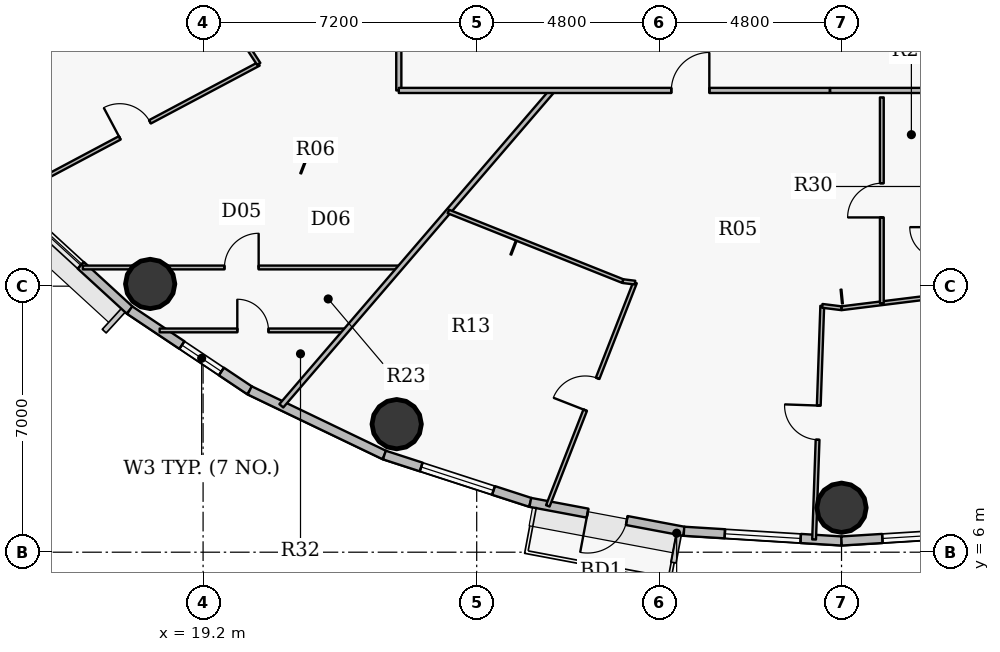
"""IFC4 building model, lengths in metres.
Left out: names, types, materials, properties, quantities, classifications, styles, units other than length and angle.
Written with IfcOpenShell. Run it as: python <this file> out.ifc"""

import sys

from ifc_helpers import new_model, si_unit, direction, frame, frame_2d, origin, origin_2d, place, context, subcontext, project, spatial, rectangle, hollow_circle, extrude, source, transform, mapped, element, fill, save


model = new_model("IFC4")
c1 = context("Model", 3, precision=1e-05, world=origin(), true_north=direction((0.0, 1.0)))
c2 = subcontext(c1, "Body", "Model", "MODEL_VIEW")
j1 = project(units=[si_unit("LENGTHUNIT", "METRE"), si_unit("PLANEANGLEUNIT", "RADIAN")], contexts=[c1])
p1 = place(None, origin())
s1 = spatial("IfcSite", under=j1, at=p1, CompositionType="ELEMENT")
p2 = place(p1, origin())
s2 = spatial("IfcBuilding", under=s1, at=p2, CompositionType="ELEMENT")
p3 = place(p2, frame((0.0, 0.0, 174.9)))
s3 = spatial("IfcBuildingStorey", under=s2, at=p3, CompositionType="ELEMENT", Elevation=174.9)
for number, where, z_axis, x_axis in (
    (1, (17.808, 13.058, 0.0), (0.0, 0.0, 1.0), (1.0, 0.0, 0.0)),
    (2, (24.294, 9.369, 0.0), (0.0, 0.0, 1.0), (1.0, 0.0, 0.0)),
    (3, (36.0, 7.17, 0.0), (0.0, 0.0, 1.0), (1.0, 0.0, 0.0)),
):
    element("IfcColumn", number, at=place(p3, frame(where, z_axis=z_axis, x_axis=x_axis)), inside=s3, PredefinedType="COLUMN", context=c2, shape_type="SweptSolid", body=[
        extrude(hollow_circle(Radius=0.65, WallThickness=0.04, at=origin_2d()), origin(), (0.0, 0.0, 1.0), 3.75),
    ])
p4 = place(p3, frame((17.268, 12.369, 0.0), z_axis=(0.0, 0.0, 1.0), x_axis=(-0.737076565834, 0.675809245349, 0.0)))
e4 = element("IfcWall", 4, at=p4, inside=s3, PredefinedType="SOLIDWALL", context=c2, shape_type="SweptSolid", body=[
    extrude(rectangle(XDim=3.658, YDim=0.24, at=frame_2d((1.829, 0.0))), origin(), (0.0, 0.0, 1.0), 3.5),
])
p5 = place(p4, frame((1.746, 0.0, 0.9)))
e5 = element("IfcOpeningElement", 5, at=p5, cuts=e4, PredefinedType="OPENING", context=c2, shape_type="SweptSolid", body=[
    extrude(rectangle(XDim=1.25, YDim=1.65, at=origin_2d()), frame((0.625, 0.13, 0.825), z_axis=(0.0, -1.0, 0.0), x_axis=(1.0, 0.0, 0.0)), (0.0, 0.0, 1.0), 0.26),
])
p6 = place(p3, frame((20.427, 10.257, 0.0), z_axis=(0.0, 0.0, 1.0), x_axis=(-0.831228998277, 0.555930168657, 0.0)))
e6 = element("IfcWall", 6, at=p6, inside=s3, PredefinedType="SOLIDWALL", context=c2, shape_type="SweptSolid", body=[
    extrude(rectangle(XDim=3.8, YDim=0.24, at=frame_2d((1.9, 0.0))), origin(), (0.0, 0.0, 1.0), 3.5),
])
p7 = place(p6, frame((0.896, 0.0, 0.9)))
e7 = element("IfcOpeningElement", 7, at=p7, cuts=e6, PredefinedType="OPENING", context=c2, shape_type="SweptSolid", body=[
    extrude(rectangle(XDim=1.25, YDim=1.65, at=origin_2d()), frame((0.625, 0.13, 0.825), z_axis=(0.0, -1.0, 0.0), x_axis=(1.0, 0.0, 0.0)), (0.0, 0.0, 1.0), 0.26),
])
p8 = place(p3, frame((23.97, 8.556, 0.0), z_axis=(0.0, 0.0, 1.0), x_axis=(-0.901564733809, 0.432644231155, 0.0)))
e8 = element("IfcWall", 8, at=p8, inside=s3, PredefinedType="SOLIDWALL", context=c2, shape_type="SweptSolid", body=[
    extrude(rectangle(XDim=3.93, YDim=0.24, at=frame_2d((1.965, 0.0))), origin(), (0.0, 0.0, 1.0), 3.5),
])
p9 = place(p3, frame((27.811, 7.311, 0.0), z_axis=(0.0, 0.0, 1.0), x_axis=(-0.951209870236, 0.30854462038, 0.0)))
e9 = element("IfcWall", 9, at=p9, inside=s3, PredefinedType="SOLIDWALL", context=c2, shape_type="SweptSolid", body=[
    extrude(rectangle(XDim=4.038, YDim=0.24, at=frame_2d((2.019, 0.0))), origin(), (0.0, 0.0, 1.0), 3.5),
])
p10 = place(p9, frame((1.019, 0.0, 0.9)))
e10 = element("IfcOpeningElement", 10, at=p10, cuts=e9, PredefinedType="OPENING", context=c2, shape_type="SweptSolid", body=[
    extrude(rectangle(XDim=2.0, YDim=1.75, at=origin_2d()), frame((1.0, 0.13, 0.875), z_axis=(0.0, -1.0, 0.0), x_axis=(1.0, 0.0, 0.0)), (0.0, 0.0, 1.0), 0.26),
])
p11 = place(p3, frame((31.854, 6.551, 0.0), z_axis=(0.0, 0.0, 1.0), x_axis=(-0.982788108205, 0.184736391573, 0.0)))
e11 = element("IfcWall", 11, at=p11, inside=s3, PredefinedType="SOLIDWALL", context=c2, shape_type="SweptSolid", body=[
    extrude(rectangle(XDim=4.114, YDim=0.24, at=frame_2d((2.057, 0.0))), origin(), (0.0, 0.0, 1.0), 3.5),
])
p12 = place(p11, frame((1.532, 0.0, 0.0)))
e12 = element("IfcOpeningElement", 12, at=p12, cuts=e11, PredefinedType="OPENING", context=c2, shape_type="SweptSolid", body=[
    extrude(rectangle(XDim=1.05, YDim=2.15, at=origin_2d()), frame((0.525, 0.13, 1.075), z_axis=(0.0, -1.0, 0.0), x_axis=(1.0, 0.0, 0.0)), (0.0, 0.0, 1.0), 0.26),
])
p13 = place(p3, frame((36.0, 6.295, 0.0), z_axis=(0.0, 0.0, 1.0), x_axis=(-0.998104600619, 0.061540281305, 0.0)))
e13 = element("IfcWall", 13, at=p13, inside=s3, PredefinedType="SOLIDWALL", context=c2, shape_type="SweptSolid", body=[
    extrude(rectangle(XDim=4.154, YDim=0.24, at=frame_2d((2.077, 0.0))), origin(), (0.0, 0.0, 1.0), 3.5),
])
p14 = place(p13, frame((1.077, 0.0, 0.9)))
e14 = element("IfcOpeningElement", 14, at=p14, cuts=e13, PredefinedType="OPENING", context=c2, shape_type="SweptSolid", body=[
    extrude(rectangle(XDim=2.0, YDim=1.75, at=origin_2d()), frame((1.0, 0.13, 0.875), z_axis=(0.0, -1.0, 0.0), x_axis=(1.0, 0.0, 0.0)), (0.0, 0.0, 1.0), 0.26),
])
p15 = place(p3, frame((40.146, 6.551, 0.0), z_axis=(0.0, 0.0, 1.0), x_axis=(-0.998104600619, -0.061540281305, 0.0)))
e15 = element("IfcWall", 15, at=p15, inside=s3, PredefinedType="SOLIDWALL", context=c2, shape_type="SweptSolid", body=[
    extrude(rectangle(XDim=4.154, YDim=0.24, at=frame_2d((2.077, 0.0))), origin(), (0.0, 0.0, 1.0), 3.5),
])
p16 = place(p15, frame((1.077, 0.0, 0.9)))
e16 = element("IfcOpeningElement", 16, at=p16, cuts=e15, PredefinedType="OPENING", context=c2, shape_type="SweptSolid", body=[
    extrude(rectangle(XDim=2.0, YDim=1.75, at=origin_2d()), frame((1.0, 0.13, 0.875), z_axis=(0.0, -1.0, 0.0), x_axis=(1.0, 0.0, 0.0)), (0.0, 0.0, 1.0), 0.26),
])
p17 = place(p3, frame((14.145, 15.379, 0.0), z_axis=(0.0, 0.0, 1.0), x_axis=(0.882946160832, 0.469474256027, 0.0)))
e17 = element("IfcWall", 17, at=p17, inside=s3, PredefinedType="PARTITIONING", context=c2, shape_type="SweptSolid", body=[
    extrude(rectangle(XDim=7.385, YDim=0.1, at=frame_2d((3.692, 0.0))), origin(), (0.0, 0.0, 1.0), 2.935),
])
p18 = place(p17, frame((3.242, 0.0, 0.0)))
e18 = element("IfcOpeningElement", 18, at=p18, cuts=e17, PredefinedType="OPENING", context=c2, shape_type="SweptSolid", body=[
    extrude(rectangle(XDim=0.9, YDim=2.1, at=origin_2d()), frame((0.45, 0.06, 1.05), z_axis=(0.0, -1.0, 0.0), x_axis=(1.0, 0.0, 0.0)), (0.0, 0.0, 1.0), 0.12),
])
p19 = place(p3, frame((16.037, 13.491, 0.0), z_axis=(0.0, 0.0, 1.0), x_axis=(1.0, 0.0, 0.0)))
e19 = element("IfcWall", 19, at=p19, inside=s3, PredefinedType="PARTITIONING", context=c2, shape_type="SweptSolid", body=[
    extrude(rectangle(XDim=8.35, YDim=0.1, at=frame_2d((4.175, 0.0))), origin(), (0.0, 0.0, 1.0), 2.935),
])
p20 = place(p19, frame((3.725, 0.0, 0.0)))
e20 = element("IfcOpeningElement", 20, at=p20, cuts=e19, PredefinedType="OPENING", context=c2, shape_type="SweptSolid", body=[
    extrude(rectangle(XDim=0.9, YDim=2.1, at=origin_2d()), frame((0.45, 0.06, 1.05), z_axis=(0.0, -1.0, 0.0), x_axis=(1.0, 0.0, 0.0)), (0.0, 0.0, 1.0), 0.12),
])
p21 = place(p3, frame((18.057, 11.836, 0.0), z_axis=(0.0, 0.0, 1.0), x_axis=(1.0, 0.0, 0.0)))
e21 = element("IfcWall", 21, at=p21, inside=s3, PredefinedType="PARTITIONING", context=c2, shape_type="SweptSolid", body=[
    extrude(rectangle(XDim=4.907, YDim=0.1, at=frame_2d((2.453, 0.0))), origin(), (0.0, 0.0, 1.0), 2.935),
])
p22 = place(p21, frame((2.043, 0.0, 0.0)))
e22 = element("IfcOpeningElement", 22, at=p22, cuts=e21, PredefinedType="OPENING", context=c2, shape_type="SweptSolid", body=[
    extrude(rectangle(XDim=0.82, YDim=2.1, at=origin_2d()), frame((0.41, 0.06, 1.05), z_axis=(0.0, -1.0, 0.0), x_axis=(1.0, 0.0, 0.0)), (0.0, 0.0, 1.0), 0.12),
])
p23 = place(p3, frame((18.291, 22.494, 0.0), z_axis=(0.0, 0.0, 1.0), x_axis=(0.545410225271, -0.838169246734, 0.0)))
e23 = element("IfcWall", 23, at=p23, inside=s3, PredefinedType="PARTITIONING", context=c2, shape_type="SweptSolid", body=[
    extrude(rectangle(XDim=4.352, YDim=0.1, at=frame_2d((2.176, 0.0))), origin(), (0.0, 0.0, 1.0), 2.935),
])
p24 = place(p3, frame((21.259, 9.852, 0.0), z_axis=(0.0, 0.0, 1.0), x_axis=(0.651889454341, 0.758314011026, 0.0)))
e24 = element("IfcWall", 24, at=p24, inside=s3, PredefinedType="PARTITIONING", context=c2, shape_type="SweptSolid", body=[
    extrude(rectangle(XDim=10.942, YDim=0.135, at=frame_2d((5.471, 0.0))), origin(), (0.0, 0.0, 1.0), 2.935),
])
p25 = place(p3, frame((24.35, 18.15, 0.0), z_axis=(0.0, 0.0, 1.0), x_axis=(0.0, 1.0, 0.0)))
e25 = element("IfcWall", 25, at=p25, inside=s3, PredefinedType="PARTITIONING", context=c2, shape_type="SweptSolid", body=[
    extrude(rectangle(XDim=7.485, YDim=0.135, at=frame_2d((3.742, 0.0))), origin(), (0.0, 0.0, 1.0), 2.935),
])
p26 = place(p25, frame((3.242, 0.0, 0.0)))
e26 = element("IfcOpeningElement", 26, at=p26, cuts=e25, PredefinedType="OPENING", context=c2, shape_type="SweptSolid", body=[
    extrude(rectangle(XDim=1.0, YDim=2.15, at=origin_2d()), frame((0.5, 0.078, 1.075), z_axis=(0.0, -1.0, 0.0), x_axis=(1.0, 0.0, 0.0)), (0.0, 0.0, 1.0), 0.155),
])
p27 = place(p3, frame((24.35, 18.15, 0.0), z_axis=(0.0, 0.0, 1.0), x_axis=(1.0, 0.0, 0.0)))
e27 = element("IfcWall", 27, at=p27, inside=s3, PredefinedType="PARTITIONING", context=c2, shape_type="SweptSolid", body=[
    extrude(rectangle(XDim=11.341, YDim=0.135, at=frame_2d((5.67, 0.0))), origin(), (0.0, 0.0, 1.0), 2.935),
])
p28 = place(p27, frame((7.171, 0.0, 0.0)))
e28 = element("IfcOpeningElement", 28, at=p28, cuts=e27, PredefinedType="OPENING", context=c2, shape_type="SweptSolid", body=[
    extrude(rectangle(XDim=1.0, YDim=2.15, at=origin_2d()), frame((0.5, 0.078, 1.075), z_axis=(0.0, -1.0, 0.0), x_axis=(1.0, 0.0, 0.0)), (0.0, 0.0, 1.0), 0.155),
])
p29 = place(p3, frame((25.654, 14.965, 0.0), z_axis=(0.0, 0.0, 1.0), x_axis=(0.928793067963, -0.370598754589, 0.0)))
e29 = element("IfcWall", 29, at=p29, inside=s3, PredefinedType="PARTITIONING", context=c2, shape_type="SweptSolid", body=[
    extrude(rectangle(XDim=4.944, YDim=0.1, at=frame_2d((2.472, 0.0))), origin(), (0.0, 0.0, 1.0), 2.935),
])
p30 = place(p3, frame((28.271, 7.219, 0.0), z_axis=(0.0, 0.0, 1.0), x_axis=(0.363936593544, 0.931423725207, 0.0)))
e30 = element("IfcWall", 30, at=p30, inside=s3, PredefinedType="PARTITIONING", context=c2, shape_type="SweptSolid", body=[
    extrude(rectangle(XDim=6.306, YDim=0.1, at=frame_2d((3.153, 0.0))), origin(), (0.0, 0.0, 1.0), 2.935),
])
p31 = place(p30, frame((2.703, 0.0, 0.0)))
e31 = element("IfcOpeningElement", 31, at=p31, cuts=e30, PredefinedType="OPENING", context=c2, shape_type="SweptSolid", body=[
    extrude(rectangle(XDim=0.9, YDim=2.1, at=origin_2d()), frame((0.45, 0.06, 1.05), z_axis=(0.0, -1.0, 0.0), x_axis=(1.0, 0.0, 0.0)), (0.0, 0.0, 1.0), 0.12),
])
p32 = place(p3, frame((30.246, 13.133, 0.0), z_axis=(0.0, 0.0, 1.0), x_axis=(0.992451589144, -0.122637038475, 0.0)))
e32 = element("IfcWall", 32, at=p32, inside=s3, PredefinedType="PARTITIONING", context=c2, shape_type="SweptSolid", body=[
    extrude(rectangle(XDim=0.323, YDim=0.1, at=frame_2d((0.161, 0.0))), origin(), (0.0, 0.0, 1.0), 3.5),
])
p33 = place(p3, frame((35.278, 6.334, 0.0), z_axis=(0.0, 0.0, 1.0), x_axis=(0.034887406989, 0.999391249128, 0.0)))
e33 = element("IfcWall", 33, at=p33, inside=s3, PredefinedType="PARTITIONING", context=c2, shape_type="SweptSolid", body=[
    extrude(rectangle(XDim=6.151, YDim=0.1, at=frame_2d((3.076, 0.0))), origin(), (0.0, 0.0, 1.0), 2.935),
])
p34 = place(p33, frame((2.625, 0.0, 0.0)))
e34 = element("IfcOpeningElement", 34, at=p34, cuts=e33, PredefinedType="OPENING", context=c2, shape_type="SweptSolid", body=[
    extrude(rectangle(XDim=0.9, YDim=2.1, at=origin_2d()), frame((0.45, 0.06, 1.05), z_axis=(0.0, -1.0, 0.0), x_axis=(1.0, 0.0, 0.0)), (0.0, 0.0, 1.0), 0.12),
])
p35 = place(p3, frame((35.493, 12.482, 0.0), z_axis=(0.0, 0.0, 1.0), x_axis=(0.992373140554, -0.123270231229, 0.0)))
e35 = element("IfcWall", 35, at=p35, inside=s3, PredefinedType="PARTITIONING", context=c2, shape_type="SweptSolid", body=[
    extrude(rectangle(XDim=0.511, YDim=0.1, at=frame_2d((0.255, 0.0))), origin(), (0.0, 0.0, 1.0), 2.935),
])
p36 = place(p3, frame((36.0, 12.419, 0.0), z_axis=(0.0, 0.0, 1.0), x_axis=(0.992396615981, 0.123081097612, 0.0)))
e36 = element("IfcWall", 36, at=p36, inside=s3, PredefinedType="PARTITIONING", context=c2, shape_type="SweptSolid", body=[
    extrude(rectangle(XDim=5.798, YDim=0.1, at=frame_2d((2.899, 0.0))), origin(), (0.0, 0.0, 1.0), 2.935),
])
p37 = place(p3, frame((37.061, 12.551, 0.0), z_axis=(0.0, 0.0, 1.0), x_axis=(0.0, 1.0, 0.0)))
e37 = element("IfcWall", 37, at=p37, inside=s3, PredefinedType="PARTITIONING", context=c2, shape_type="SweptSolid", body=[
    extrude(rectangle(XDim=5.416, YDim=0.1, at=frame_2d((2.708, 0.0))), origin(), (0.0, 0.0, 1.0), 3.185),
])
p38 = place(p37, frame((2.258, 0.0, 0.0)))
e38 = element("IfcOpeningElement", 38, at=p38, cuts=e37, PredefinedType="OPENING", context=c2, shape_type="SweptSolid", body=[
    extrude(rectangle(XDim=0.9, YDim=2.1, at=origin_2d()), frame((0.45, 0.06, 1.05), z_axis=(0.0, -1.0, 0.0), x_axis=(1.0, 0.0, 0.0)), (0.0, 0.0, 1.0), 0.12),
])
p39 = place(p3, frame((38.306, 18.15, 0.0), z_axis=(0.0, 0.0, 1.0), x_axis=(-1.0, 0.0, 0.0)))
e39 = element("IfcWall", 39, at=p39, inside=s3, PredefinedType="PARTITIONING", context=c2, shape_type="SweptSolid", body=[
    extrude(rectangle(XDim=2.605, YDim=0.135, at=frame_2d((1.302, 0.0))), origin(), (0.0, 0.0, 1.0), 2.935),
])
m1 = source(origin(), c2, "Body", "SweptSolid", [
    extrude(rectangle(XDim=1.25, YDim=1.65, at=origin_2d()), frame((0.625, 0.03, 0.825), z_axis=(0.0, -1.0, 0.0), x_axis=(1.0, 0.0, 0.0)), (0.0, 0.0, 1.0), 0.06),
])
p40 = place(p7, origin())
e40 = element("IfcWindow", 40, at=p40, inside=s3, PartitioningType="SINGLE_PANEL", PredefinedType="WINDOW", context=c2, shape_type="MappedRepresentation", body=[
    mapped(m1, transform((0.0, 0.0, 0.0), x_axis=(1.0, 0.0, 0.0), y_axis=(0.0, 1.0, 0.0), z_axis=(0.0, 0.0, 1.0), scale=1.0)),
])
fill(e7, e40)
m2 = source(origin(), c2, "Body", "SweptSolid", [
    extrude(rectangle(XDim=2.0, YDim=1.75, at=origin_2d()), frame((1.0, 0.03, 0.875), z_axis=(0.0, -1.0, 0.0), x_axis=(1.0, 0.0, 0.0)), (0.0, 0.0, 1.0), 0.06),
])
p41 = place(p10, origin())
e41 = element("IfcWindow", 41, at=p41, inside=s3, PartitioningType="DOUBLE_PANEL_VERTICAL", PredefinedType="WINDOW", context=c2, shape_type="MappedRepresentation", body=[
    mapped(m2, transform((0.0, 0.0, 0.0), x_axis=(1.0, 0.0, 0.0), y_axis=(0.0, 1.0, 0.0), z_axis=(0.0, 0.0, 1.0), scale=1.0)),
])
fill(e10, e41)
m3 = source(origin(), c2, "Body", "SweptSolid", [
    extrude(rectangle(XDim=1.05, YDim=2.15, at=origin_2d()), frame((0.525, 0.025, 1.075), z_axis=(0.0, -1.0, 0.0), x_axis=(1.0, 0.0, 0.0)), (0.0, 0.0, 1.0), 0.05),
])
p42 = place(p12, origin())
e42 = element("IfcDoor", 42, at=p42, inside=s3, OperationType="SINGLE_SWING_RIGHT", PredefinedType="DOOR", context=c2, shape_type="MappedRepresentation", body=[
    mapped(m3, transform((0.0, 0.0, 0.0), x_axis=(1.0, 0.0, 0.0), y_axis=(0.0, 1.0, 0.0), z_axis=(0.0, 0.0, 1.0), scale=1.0)),
])
fill(e12, e42)
p43 = place(p14, origin())
e43 = element("IfcWindow", 43, at=p43, inside=s3, PartitioningType="DOUBLE_PANEL_VERTICAL", PredefinedType="WINDOW", context=c2, shape_type="MappedRepresentation", body=[
    mapped(m2, transform((0.0, 0.0, 0.0), x_axis=(1.0, 0.0, 0.0), y_axis=(0.0, 1.0, 0.0), z_axis=(0.0, 0.0, 1.0), scale=1.0)),
])
fill(e14, e43)
p44 = place(p16, origin())
e44 = element("IfcWindow", 44, at=p44, inside=s3, PartitioningType="DOUBLE_PANEL_VERTICAL", PredefinedType="WINDOW", context=c2, shape_type="MappedRepresentation", body=[
    mapped(m2, transform((0.0, 0.0, 0.0), x_axis=(1.0, 0.0, 0.0), y_axis=(0.0, 1.0, 0.0), z_axis=(0.0, 0.0, 1.0), scale=1.0)),
])
fill(e16, e44)
p45 = place(p5, origin())
e45 = element("IfcWindow", 45, at=p45, inside=s3, PartitioningType="SINGLE_PANEL", PredefinedType="WINDOW", context=c2, shape_type="MappedRepresentation", body=[
    mapped(m1, transform((0.0, 0.0, 0.0), x_axis=(1.0, 0.0, 0.0), y_axis=(0.0, 1.0, 0.0), z_axis=(0.0, 0.0, 1.0), scale=1.0)),
])
fill(e5, e45)
m4 = source(origin(), c2, "Body", "SweptSolid", [
    extrude(rectangle(XDim=0.9, YDim=2.1, at=origin_2d()), frame((0.45, 0.025, 1.05), z_axis=(0.0, -1.0, 0.0), x_axis=(1.0, 0.0, 0.0)), (0.0, 0.0, 1.0), 0.05),
])
p46 = place(p18, origin())
e46 = element("IfcDoor", 46, at=p46, inside=s3, OperationType="SINGLE_SWING_LEFT", PredefinedType="DOOR", context=c2, shape_type="MappedRepresentation", body=[
    mapped(m4, transform((0.0, 0.0, 0.0), x_axis=(1.0, 0.0, 0.0), y_axis=(0.0, 1.0, 0.0), z_axis=(0.0, 0.0, 1.0), scale=1.0)),
])
fill(e18, e46)
p47 = place(p20, origin())
e47 = element("IfcDoor", 47, at=p47, inside=s3, OperationType="SINGLE_SWING_RIGHT", PredefinedType="DOOR", context=c2, shape_type="MappedRepresentation", body=[
    mapped(m4, transform((0.0, 0.0, 0.0), x_axis=(1.0, 0.0, 0.0), y_axis=(0.0, 1.0, 0.0), z_axis=(0.0, 0.0, 1.0), scale=1.0)),
])
fill(e20, e47)
m5 = source(origin(), c2, "Body", "SweptSolid", [
    extrude(rectangle(XDim=0.82, YDim=2.1, at=origin_2d()), frame((0.41, 0.025, 1.05), z_axis=(0.0, -1.0, 0.0), x_axis=(1.0, 0.0, 0.0)), (0.0, 0.0, 1.0), 0.05),
])
p48 = place(p22, origin())
e48 = element("IfcDoor", 48, at=p48, inside=s3, OperationType="SINGLE_SWING_LEFT", PredefinedType="DOOR", context=c2, shape_type="MappedRepresentation", body=[
    mapped(m5, transform((0.0, 0.0, 0.0), x_axis=(1.0, 0.0, 0.0), y_axis=(0.0, 1.0, 0.0), z_axis=(0.0, 0.0, 1.0), scale=1.0)),
])
fill(e22, e48)
m6 = source(origin(), c2, "Body", "SweptSolid", [
    extrude(rectangle(XDim=1.0, YDim=2.15, at=origin_2d()), frame((0.5, 0.025, 1.075), z_axis=(0.0, -1.0, 0.0), x_axis=(1.0, 0.0, 0.0)), (0.0, 0.0, 1.0), 0.05),
])
p49 = place(p28, origin())
e49 = element("IfcDoor", 49, at=p49, inside=s3, OperationType="SINGLE_SWING_RIGHT", PredefinedType="DOOR", context=c2, shape_type="MappedRepresentation", body=[
    mapped(m6, transform((0.0, 0.0, 0.0), x_axis=(1.0, 0.0, 0.0), y_axis=(0.0, 1.0, 0.0), z_axis=(0.0, 0.0, 1.0), scale=1.0)),
])
fill(e28, e49)
p50 = place(p31, origin())
e50 = element("IfcDoor", 50, at=p50, inside=s3, OperationType="SINGLE_SWING_LEFT", PredefinedType="DOOR", context=c2, shape_type="MappedRepresentation", body=[
    mapped(m4, transform((0.0, 0.0, 0.0), x_axis=(1.0, 0.0, 0.0), y_axis=(0.0, 1.0, 0.0), z_axis=(0.0, 0.0, 1.0), scale=1.0)),
])
fill(e31, e50)
p51 = place(p34, origin())
e51 = element("IfcDoor", 51, at=p51, inside=s3, OperationType="SINGLE_SWING_RIGHT", PredefinedType="DOOR", context=c2, shape_type="MappedRepresentation", body=[
    mapped(m4, transform((0.0, 0.0, 0.0), x_axis=(1.0, 0.0, 0.0), y_axis=(0.0, 1.0, 0.0), z_axis=(0.0, 0.0, 1.0), scale=1.0)),
])
fill(e34, e51)
p52 = place(p38, origin())
e52 = element("IfcDoor", 52, at=p52, inside=s3, OperationType="SINGLE_SWING_LEFT", PredefinedType="DOOR", context=c2, shape_type="MappedRepresentation", body=[
    mapped(m4, transform((0.0, 0.0, 0.0), x_axis=(1.0, 0.0, 0.0), y_axis=(0.0, 1.0, 0.0), z_axis=(0.0, 0.0, 1.0), scale=1.0)),
])
fill(e38, e52)
save(model, sys.argv[1])
